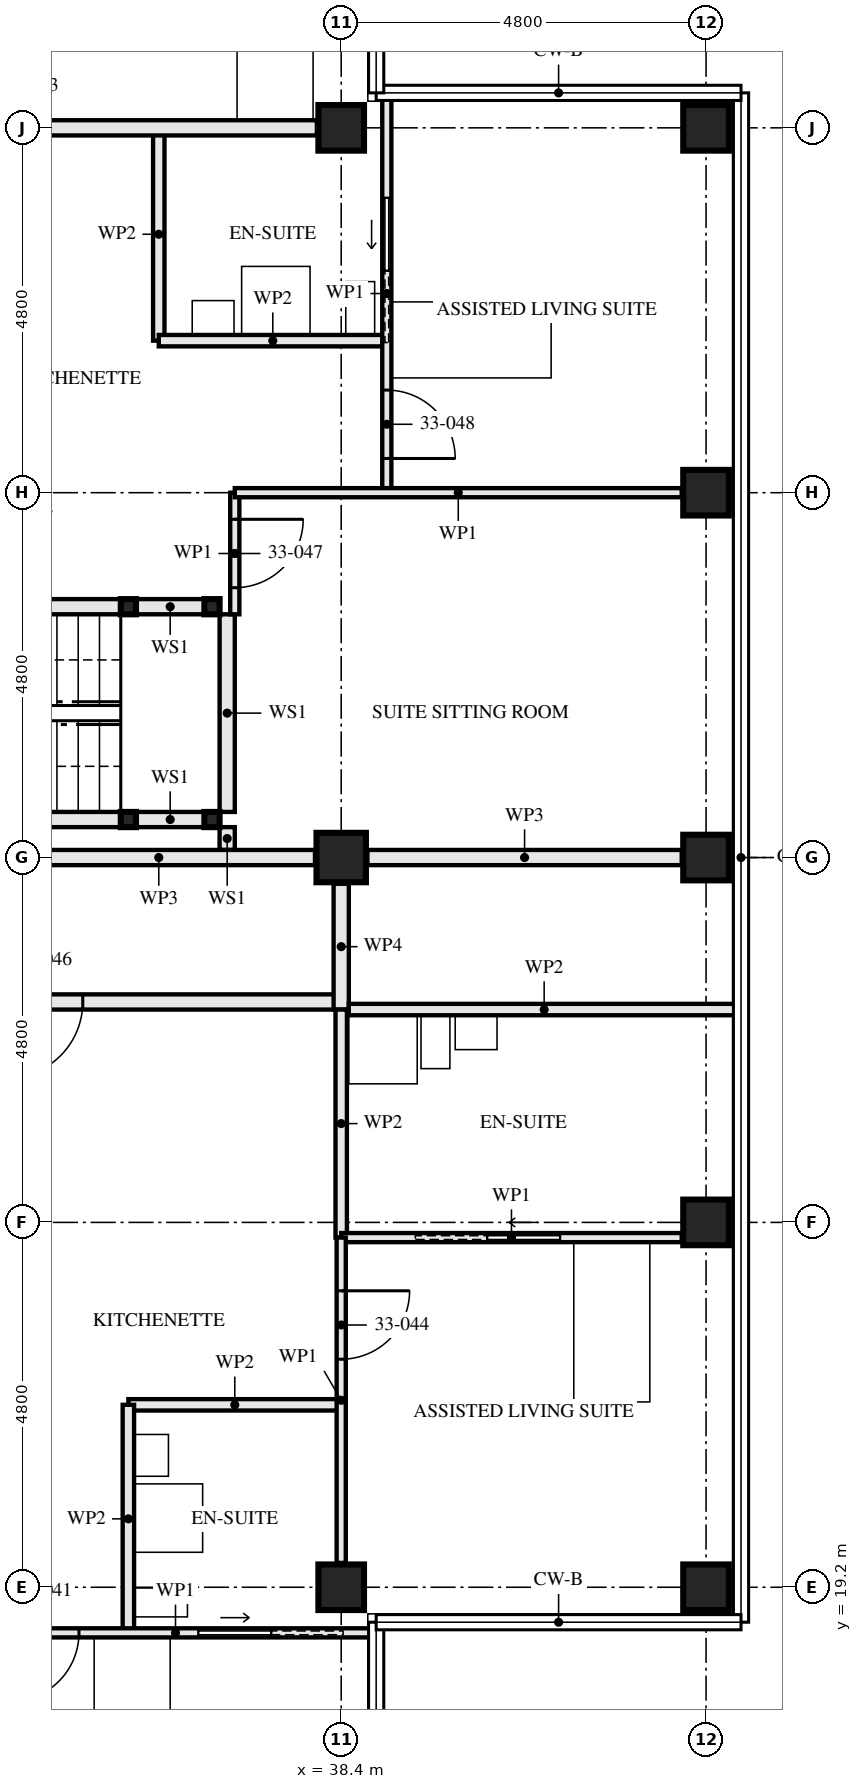
"""IFC4 building model, lengths in metres.
Left out: names, types, materials, properties, quantities, classifications, styles, units other than length and angle.
Written with IfcOpenShell. Run it as: python <this file> out.ifc"""

import sys

from ifc_helpers import new_model, si_unit, direction, frame, frame_2d, origin, origin_2d, place, context, subcontext, project, spatial, rectangle, hollow_rectangle, extrude, element, fill, save


model = new_model("IFC4")
c1 = context("Model", 3, precision=1e-05, world=origin(), true_north=direction((0.0, 1.0)))
c2 = subcontext(c1, "Body", "Model", "MODEL_VIEW")
j1 = project(units=[si_unit("LENGTHUNIT", "METRE"), si_unit("PLANEANGLEUNIT", "RADIAN")], contexts=[c1])
p1 = place(None, origin())
s1 = spatial("IfcSite", under=j1, at=p1, CompositionType="ELEMENT")
p2 = place(p1, origin())
s2 = spatial("IfcBuilding", under=s1, at=p2, CompositionType="ELEMENT")
p3 = place(p2, frame((0.0, 0.0, 122.5)))
s3 = spatial("IfcBuildingStorey", under=s2, at=p3, CompositionType="ELEMENT", Elevation=122.5)
p4 = place(p3, frame((38.4, 19.2, 0.0), z_axis=(0.0, 0.0, 1.0), x_axis=(0.0, 1.0, 0.0)))
e1 = element("IfcColumn", 1, at=p4, inside=s3, PredefinedType="COLUMN", context=c2, shape_type="SweptSolid", body=[
    extrude(hollow_rectangle(XDim=0.6, YDim=0.6, WallThickness=0.08, at=origin_2d()), origin(), (0.0, 0.0, 1.0), 3.5),
])
p5 = place(p3, frame((38.4, 28.8, 0.0), z_axis=(0.0, 0.0, 1.0), x_axis=(0.0, 1.0, 0.0)))
e2 = element("IfcColumn", 2, at=p5, inside=s3, PredefinedType="COLUMN", context=c2, shape_type="SweptSolid", body=[
    extrude(hollow_rectangle(XDim=0.65, YDim=0.65, WallThickness=0.05, at=origin_2d()), origin(), (0.0, 0.0, 1.0), 3.5),
])
for number, where, z_axis, x_axis in (
    (3, (38.4, 38.4, 0.0), (0.0, 0.0, 1.0), (0.0, 1.0, 0.0)),
    (4, (43.2, 19.2, 0.0), (0.0, 0.0, 1.0), (0.0, 1.0, 0.0)),
    (5, (43.2, 24.0, 0.0), (0.0, 0.0, 1.0), (1.0, 0.0, 0.0)),
    (6, (43.2, 28.8, 0.0), (0.0, 0.0, 1.0), (0.0, 1.0, 0.0)),
    (7, (43.2, 33.6, 0.0), (0.0, 0.0, 1.0), (1.0, 0.0, 0.0)),
    (8, (43.2, 38.4, 0.0), (0.0, 0.0, 1.0), (0.0, 1.0, 0.0)),
):
    element("IfcColumn", number, at=place(p3, frame(where, z_axis=z_axis, x_axis=x_axis)), inside=s3, PredefinedType="COLUMN", context=c2, shape_type="SweptSolid", body=[
        extrude(hollow_rectangle(XDim=0.6, YDim=0.6, WallThickness=0.08, at=origin_2d()), origin(), (0.0, 0.0, 1.0), 3.5),
    ])
for number, where, z_axis, x_axis in (
    (9, (36.7, 29.3, 0.0), (0.0, 0.0, 1.0), (1.0, 0.0, 0.0)),
    (10, (36.7, 32.1, 0.0), (0.0, 0.0, 1.0), (1.0, 0.0, 0.0)),
    (11, (35.6, 29.3, 0.0), (0.0, 0.0, 1.0), (1.0, 0.0, 0.0)),
    (12, (35.6, 32.1, 0.0), (0.0, 0.0, 1.0), (1.0, 0.0, 0.0)),
):
    element("IfcColumn", number, at=place(p3, frame(where, z_axis=z_axis, x_axis=x_axis)), inside=s3, PredefinedType="COLUMN", context=c2, shape_type="SweptSolid", body=[
        extrude(hollow_rectangle(XDim=0.2, YDim=0.2, WallThickness=0.008, at=origin_2d()), origin(), (0.0, 0.0, 1.0), 3.33),
    ])
p6 = place(p3, frame((35.6, 18.6, 0.0), z_axis=(0.0, 0.0, 1.0), x_axis=(0.0, 1.0, 0.0)))
e13 = element("IfcWall", 13, at=p6, inside=s3, PredefinedType="PARTITIONING", context=c2, shape_type="SweptSolid", body=[
    extrude(rectangle(XDim=3.0, YDim=0.15, at=frame_2d((1.5, 0.0))), origin(), (0.0, 0.0, 1.0), 2.55),
])
p7 = place(p3, frame((35.6, 21.6, 0.0), z_axis=(0.0, 0.0, 1.0), x_axis=(1.0, 0.0, 0.0)))
e14 = element("IfcWall", 14, at=p7, inside=s3, PredefinedType="PARTITIONING", context=c2, shape_type="SweptSolid", body=[
    extrude(rectangle(XDim=2.8, YDim=0.15, at=frame_2d((1.4, 0.0))), origin(), (0.0, 0.0, 1.0), 3.33),
])
p8 = place(p3, frame((38.4, 23.8, 0.0), z_axis=(0.0, 0.0, 1.0), x_axis=(0.0, 1.0, 0.0)))
e15 = element("IfcWall", 15, at=p8, inside=s3, PredefinedType="PARTITIONING", context=c2, shape_type="SweptSolid", body=[
    extrude(rectangle(XDim=3.0, YDim=0.15, at=frame_2d((1.5, 0.0))), origin(), (0.0, 0.0, 1.0), 2.55),
])
p9 = place(p3, frame((33.6, 18.6, 0.0), z_axis=(0.0, 0.0, 1.0), x_axis=(1.0, 0.0, 0.0)))
e16 = element("IfcWall", 16, at=p9, inside=s3, PredefinedType="PARTITIONING", context=c2, shape_type="SweptSolid", body=[
    extrude(rectangle(XDim=5.24, YDim=0.12, at=frame_2d((2.62, 0.0))), origin(), (0.0, 0.0, 1.0), 2.32),
])
p10 = place(p9, frame((0.45, 0.0, 0.0)))
e17 = element("IfcOpeningElement", 17, at=p10, cuts=e16, PredefinedType="OPENING", context=c2, shape_type="SweptSolid", body=[
    extrude(rectangle(XDim=0.9, YDim=2.1, at=frame_2d((0.45, 1.05))), frame((0.0, 0.071, 0.0), z_axis=(0.0, -1.0, 0.0), x_axis=(1.0, 0.0, 0.0)), (0.0, 0.0, 1.0), 0.141),
])
p11 = place(p9, frame((2.925, 0.0, 0.0)))
e18 = element("IfcOpeningElement", 18, at=p11, cuts=e16, PredefinedType="OPENING", context=c2, shape_type="SweptSolid", body=[
    extrude(rectangle(XDim=0.95, YDim=2.1, at=frame_2d((0.475, 1.05))), frame((0.0, 0.071, 0.0), z_axis=(0.0, -1.0, 0.0), x_axis=(1.0, 0.0, 0.0)), (0.0, 0.0, 1.0), 0.141),
])
p12 = place(p3, frame((38.4, 23.8, 0.0), z_axis=(0.0, 0.0, 1.0), x_axis=(1.0, 0.0, 0.0)))
e19 = element("IfcWall", 19, at=p12, inside=s3, PredefinedType="PARTITIONING", context=c2, shape_type="SweptSolid", body=[
    extrude(rectangle(XDim=4.48, YDim=0.12, at=frame_2d((2.24, 0.0))), origin(), (0.0, 0.0, 1.0), 3.33),
])
p13 = place(p12, frame((1.925, 0.0, 0.0)))
e20 = element("IfcOpeningElement", 20, at=p13, cuts=e19, PredefinedType="OPENING", context=c2, shape_type="SweptSolid", body=[
    extrude(rectangle(XDim=0.95, YDim=2.1, at=frame_2d((0.475, 1.05))), frame((0.0, 0.071, 0.0), z_axis=(0.0, -1.0, 0.0), x_axis=(1.0, 0.0, 0.0)), (0.0, 0.0, 1.0), 0.141),
])
p14 = place(p3, frame((38.4, 19.52, 0.0), z_axis=(0.0, 0.0, 1.0), x_axis=(0.0, 1.0, 0.0)))
e21 = element("IfcWall", 21, at=p14, inside=s3, PredefinedType="PARTITIONING", context=c2, shape_type="SweptSolid", body=[
    extrude(rectangle(XDim=4.28, YDim=0.12, at=frame_2d((2.14, 0.0))), origin(), (0.0, 0.0, 1.0), 3.33),
])
p15 = place(p14, frame((2.68, 0.0, 0.0)))
e22 = element("IfcOpeningElement", 22, at=p15, cuts=e21, PredefinedType="OPENING", context=c2, shape_type="SweptSolid", body=[
    extrude(rectangle(XDim=0.9, YDim=2.1, at=frame_2d((0.45, 1.05))), frame((0.0, 0.071, 0.0), z_axis=(0.0, -1.0, 0.0), x_axis=(1.0, 0.0, 0.0)), (0.0, 0.0, 1.0), 0.141),
])
p16 = place(p3, frame((28.8, 26.9, 0.0), z_axis=(0.0, 0.0, 1.0), x_axis=(1.0, 0.0, 0.0)))
e23 = element("IfcWall", 23, at=p16, inside=s3, PredefinedType="PARTITIONING", context=c2, shape_type="SweptSolid", body=[
    extrude(rectangle(XDim=9.6, YDim=0.2, at=frame_2d((4.8, 0.0))), origin(), (0.0, 0.0, 1.0), 3.33),
])
p17 = place(p16, frame((0.4, 0.0, 0.0)))
e24 = element("IfcOpeningElement", 24, at=p17, cuts=e23, PredefinedType="OPENING", context=c2, shape_type="SweptSolid", body=[
    extrude(rectangle(XDim=1.0, YDim=2.1, at=frame_2d((0.5, 1.05))), frame((0.0, 0.111, 0.0), z_axis=(0.0, -1.0, 0.0), x_axis=(1.0, 0.0, 0.0)), (0.0, 0.0, 1.0), 0.221),
])
p18 = place(p16, frame((5.2, 0.0, 0.0)))
e25 = element("IfcOpeningElement", 25, at=p18, cuts=e23, PredefinedType="OPENING", context=c2, shape_type="SweptSolid", body=[
    extrude(rectangle(XDim=1.0, YDim=2.1, at=frame_2d((0.5, 1.05))), frame((0.0, 0.111, 0.0), z_axis=(0.0, -1.0, 0.0), x_axis=(1.0, 0.0, 0.0)), (0.0, 0.0, 1.0), 0.221),
])
p19 = place(p3, frame((38.4, 26.8, 0.0), z_axis=(0.0, 0.0, 1.0), x_axis=(0.0, 1.0, 0.0)))
e26 = element("IfcWall", 26, at=p19, inside=s3, PredefinedType="PARTITIONING", context=c2, shape_type="SweptSolid", body=[
    extrude(rectangle(XDim=1.655, YDim=0.2, at=frame_2d((0.828, 0.0))), origin(), (0.0, 0.0, 1.0), 3.33),
])
p20 = place(p3, frame((36.6, 29.3, 0.0), z_axis=(0.0, 0.0, 1.0), x_axis=(-1.0, 0.0, 0.0)))
e27 = element("IfcWall", 27, at=p20, inside=s3, PredefinedType="SOLIDWALL", context=c2, shape_type="SweptSolid", body=[
    extrude(rectangle(XDim=0.9, YDim=0.2, at=frame_2d((0.45, 0.0))), origin(), (0.0, 0.0, 1.0), 2.99),
])
p21 = place(p3, frame((35.5, 29.3, 0.0), z_axis=(0.0, 0.0, 1.0), x_axis=(-1.0, 0.0, 0.0)))
e28 = element("IfcWall", 28, at=p21, inside=s3, PredefinedType="SOLIDWALL", context=c2, shape_type="SweptSolid", body=[
    extrude(rectangle(XDim=4.7, YDim=0.2, at=frame_2d((2.35, 0.0))), origin(), (0.0, 0.0, 1.0), 2.99),
])
p22 = place(p3, frame((36.6, 32.1, 0.0), z_axis=(0.0, 0.0, 1.0), x_axis=(-1.0, 0.0, 0.0)))
e29 = element("IfcWall", 29, at=p22, inside=s3, PredefinedType="SOLIDWALL", context=c2, shape_type="SweptSolid", body=[
    extrude(rectangle(XDim=0.9, YDim=0.2, at=frame_2d((0.45, 0.0))), origin(), (0.0, 0.0, 1.0), 2.99),
])
p23 = place(p3, frame((35.5, 32.1, 0.0), z_axis=(0.0, 0.0, 1.0), x_axis=(-1.0, 0.0, 0.0)))
e30 = element("IfcWall", 30, at=p23, inside=s3, PredefinedType="SOLIDWALL", context=c2, shape_type="SweptSolid", body=[
    extrude(rectangle(XDim=4.7, YDim=0.2, at=frame_2d((2.35, 0.0))), origin(), (0.0, 0.0, 1.0), 2.99),
])
p24 = place(p3, frame((36.9, 28.9, 0.0), z_axis=(0.0, 0.0, 1.0), x_axis=(0.0, 1.0, 0.0)))
e31 = element("IfcWall", 31, at=p24, inside=s3, PredefinedType="SOLIDWALL", context=c2, shape_type="SweptSolid", body=[
    extrude(rectangle(XDim=0.3, YDim=0.2, at=frame_2d((0.15, 0.0))), origin(), (0.0, 0.0, 1.0), 3.33),
])
p25 = place(p3, frame((36.9, 29.4, 0.0), z_axis=(0.0, 0.0, 1.0), x_axis=(0.0, 1.0, 0.0)))
e32 = element("IfcWall", 32, at=p25, inside=s3, PredefinedType="SOLIDWALL", context=c2, shape_type="SweptSolid", body=[
    extrude(rectangle(XDim=2.6, YDim=0.2, at=frame_2d((1.3, 0.0))), origin(), (0.0, 0.0, 1.0), 3.33),
])
p26 = place(p3, frame((39.0, 35.6, 0.0), z_axis=(0.0, 0.0, 1.0), x_axis=(-1.0, 0.0, 0.0)))
e33 = element("IfcWall", 33, at=p26, inside=s3, PredefinedType="PARTITIONING", context=c2, shape_type="SweptSolid", body=[
    extrude(rectangle(XDim=3.0, YDim=0.15, at=frame_2d((1.5, 0.0))), origin(), (0.0, 0.0, 1.0), 3.33),
])
p27 = place(p3, frame((36.0, 35.6, 0.0), z_axis=(0.0, 0.0, 1.0), x_axis=(0.0, 1.0, 0.0)))
e34 = element("IfcWall", 34, at=p27, inside=s3, PredefinedType="PARTITIONING", context=c2, shape_type="SweptSolid", body=[
    extrude(rectangle(XDim=2.8, YDim=0.15, at=frame_2d((1.4, 0.0))), origin(), (0.0, 0.0, 1.0), 3.33),
])
p28 = place(p3, frame((37.0, 32.0, 0.0), z_axis=(0.0, 0.0, 1.0), x_axis=(0.0, 1.0, 0.0)))
e35 = element("IfcWall", 35, at=p28, inside=s3, PredefinedType="PARTITIONING", context=c2, shape_type="SweptSolid", body=[
    extrude(rectangle(XDim=1.6, YDim=0.12, at=frame_2d((0.8, 0.0))), origin(), (0.0, 0.0, 1.0), 3.33),
])
p29 = place(p28, frame((0.35, 0.0, 0.0)))
e36 = element("IfcOpeningElement", 36, at=p29, cuts=e35, PredefinedType="OPENING", context=c2, shape_type="SweptSolid", body=[
    extrude(rectangle(XDim=0.9, YDim=2.1, at=frame_2d((0.45, 1.05))), frame((0.0, 0.071, 0.0), z_axis=(0.0, -1.0, 0.0), x_axis=(1.0, 0.0, 0.0)), (0.0, 0.0, 1.0), 0.141),
])
p30 = place(p3, frame((39.0, 33.6, 0.0), z_axis=(0.0, 0.0, 1.0), x_axis=(0.0, 1.0, 0.0)))
e37 = element("IfcWall", 37, at=p30, inside=s3, PredefinedType="PARTITIONING", context=c2, shape_type="SweptSolid", body=[
    extrude(rectangle(XDim=5.24, YDim=0.12, at=frame_2d((2.62, 0.0))), origin(), (0.0, 0.0, 1.0), 2.32),
])
p31 = place(p30, frame((0.45, 0.0, 0.0)))
e38 = element("IfcOpeningElement", 38, at=p31, cuts=e37, PredefinedType="OPENING", context=c2, shape_type="SweptSolid", body=[
    extrude(rectangle(XDim=0.9, YDim=2.1, at=frame_2d((0.45, 1.05))), frame((0.0, 0.071, 0.0), z_axis=(0.0, -1.0, 0.0), x_axis=(1.0, 0.0, 0.0)), (0.0, 0.0, 1.0), 0.141),
])
p32 = place(p30, frame((2.925, 0.0, 0.0)))
e39 = element("IfcOpeningElement", 39, at=p32, cuts=e37, PredefinedType="OPENING", context=c2, shape_type="SweptSolid", body=[
    extrude(rectangle(XDim=0.95, YDim=2.1, at=frame_2d((0.475, 1.05))), frame((0.0, 0.071, 0.0), z_axis=(0.0, -1.0, 0.0), x_axis=(1.0, 0.0, 0.0)), (0.0, 0.0, 1.0), 0.141),
])
p33 = place(p3, frame((42.88, 33.6, 0.0), z_axis=(0.0, 0.0, 1.0), x_axis=(-1.0, 0.0, 0.0)))
e40 = element("IfcWall", 40, at=p33, inside=s3, PredefinedType="PARTITIONING", context=c2, shape_type="SweptSolid", body=[
    extrude(rectangle(XDim=5.88, YDim=0.12, at=frame_2d((2.94, 0.0))), origin(), (0.0, 0.0, 1.0), 2.55),
])
p34 = place(p3, frame((38.08, 38.4, 0.0), z_axis=(0.0, 0.0, 1.0), x_axis=(-1.0, 0.0, 0.0)))
e41 = element("IfcWall", 41, at=p34, inside=s3, PredefinedType="PARTITIONING", context=c2, shape_type="SweptSolid", body=[
    extrude(rectangle(XDim=7.28, YDim=0.2, at=frame_2d((3.64, 0.0))), origin(), (0.0, 0.0, 1.0), 2.55),
])
p35 = place(p3, frame((42.88, 28.8, 0.0), z_axis=(0.0, 0.0, 1.0), x_axis=(-1.0, 0.0, 0.0)))
e42 = element("IfcWall", 42, at=p35, inside=s3, PredefinedType="PARTITIONING", context=c2, shape_type="SweptSolid", body=[
    extrude(rectangle(XDim=4.135, YDim=0.2, at=frame_2d((2.067, 0.0))), origin(), (0.0, 0.0, 1.0), 2.32),
])
p36 = place(p3, frame((38.055, 28.8, 0.0), z_axis=(0.0, 0.0, 1.0), x_axis=(-1.0, 0.0, 0.0)))
e43 = element("IfcWall", 43, at=p36, inside=s3, PredefinedType="PARTITIONING", context=c2, shape_type="SweptSolid", body=[
    extrude(rectangle(XDim=4.11, YDim=0.2, at=frame_2d((2.055, 0.0))), origin(), (0.0, 0.0, 1.0), 2.32),
])
p37 = place(p3, frame((38.5, 26.8, 0.0), z_axis=(0.0, 0.0, 1.0), x_axis=(1.0, 0.0, 0.0)))
e44 = element("IfcWall", 44, at=p37, inside=s3, PredefinedType="PARTITIONING", context=c2, shape_type="SweptSolid", body=[
    extrude(rectangle(XDim=5.14, YDim=0.15, at=frame_2d((2.57, 0.0))), origin(), (0.0, 0.0, 1.0), 2.32),
])
p38 = place(p10, frame((0.9, 0.0, 0.0), z_axis=(0.0, 0.0, 1.0), x_axis=(-1.0, 0.0, 0.0)))
e45 = element("IfcDoor", 45, at=p38, inside=s3, OperationType="SINGLE_SWING_LEFT", PredefinedType="DOOR", context=c2, shape_type="SweptSolid", body=[
    extrude(rectangle(XDim=0.9, YDim=2.1, at=frame_2d((0.45, 1.05))), frame((0.0, 0.022, 0.0), z_axis=(0.0, -1.0, 0.0), x_axis=(1.0, 0.0, 0.0)), (0.0, 0.0, 1.0), 0.044),
])
fill(e17, e45)
p39 = place(p11, origin())
e46 = element("IfcDoor", 46, at=p39, inside=s3, OperationType="SLIDING_TO_LEFT", PredefinedType="DOOR", context=c2, shape_type="SweptSolid", body=[
    extrude(rectangle(XDim=0.95, YDim=2.1, at=frame_2d((0.475, 1.05))), frame((0.0, 0.022, 0.0), z_axis=(0.0, -1.0, 0.0), x_axis=(1.0, 0.0, 0.0)), (0.0, 0.0, 1.0), 0.044),
])
fill(e18, e46)
p40 = place(p13, origin())
e47 = element("IfcDoor", 47, at=p40, inside=s3, OperationType="SLIDING_TO_RIGHT", PredefinedType="DOOR", context=c2, shape_type="SweptSolid", body=[
    extrude(rectangle(XDim=0.95, YDim=2.1, at=frame_2d((0.475, 1.05))), frame((0.0, 0.022, 0.0), z_axis=(0.0, -1.0, 0.0), x_axis=(1.0, 0.0, 0.0)), (0.0, 0.0, 1.0), 0.044),
])
fill(e20, e47)
p41 = place(p15, frame((0.9, 0.0, 0.0), z_axis=(0.0, 0.0, 1.0), x_axis=(-1.0, 0.0, 0.0)))
e48 = element("IfcDoor", 48, at=p41, inside=s3, OperationType="SINGLE_SWING_RIGHT", PredefinedType="DOOR", context=c2, shape_type="SweptSolid", body=[
    extrude(rectangle(XDim=0.9, YDim=2.1, at=frame_2d((0.45, 1.05))), frame((0.0, 0.022, 0.0), z_axis=(0.0, -1.0, 0.0), x_axis=(1.0, 0.0, 0.0)), (0.0, 0.0, 1.0), 0.044),
])
fill(e22, e48)
p42 = place(p18, frame((1.0, 0.0, 0.0), z_axis=(0.0, 0.0, 1.0), x_axis=(-1.0, 0.0, 0.0)))
e49 = element("IfcDoor", 49, at=p42, inside=s3, OperationType="SINGLE_SWING_LEFT", PredefinedType="DOOR", context=c2, shape_type="SweptSolid", body=[
    extrude(rectangle(XDim=1.0, YDim=2.1, at=frame_2d((0.5, 1.05))), frame((0.0, 0.027, 0.0), z_axis=(0.0, -1.0, 0.0), x_axis=(1.0, 0.0, 0.0)), (0.0, 0.0, 1.0), 0.054),
])
fill(e25, e49)
p43 = place(p29, frame((0.9, 0.0, 0.0), z_axis=(0.0, 0.0, 1.0), x_axis=(-1.0, 0.0, 0.0)))
e50 = element("IfcDoor", 50, at=p43, inside=s3, OperationType="SINGLE_SWING_RIGHT", PredefinedType="DOOR", context=c2, shape_type="SweptSolid", body=[
    extrude(rectangle(XDim=0.9, YDim=2.1, at=frame_2d((0.45, 1.05))), frame((0.0, 0.022, 0.0), z_axis=(0.0, -1.0, 0.0), x_axis=(1.0, 0.0, 0.0)), (0.0, 0.0, 1.0), 0.044),
])
fill(e36, e50)
p44 = place(p31, frame((0.9, 0.0, 0.0), z_axis=(0.0, 0.0, 1.0), x_axis=(-1.0, 0.0, 0.0)))
e51 = element("IfcDoor", 51, at=p44, inside=s3, OperationType="SINGLE_SWING_LEFT", PredefinedType="DOOR", context=c2, shape_type="SweptSolid", body=[
    extrude(rectangle(XDim=0.9, YDim=2.1, at=frame_2d((0.45, 1.05))), frame((0.0, 0.022, 0.0), z_axis=(0.0, -1.0, 0.0), x_axis=(1.0, 0.0, 0.0)), (0.0, 0.0, 1.0), 0.044),
])
fill(e38, e51)
p45 = place(p32, origin())
e52 = element("IfcDoor", 52, at=p45, inside=s3, OperationType="SLIDING_TO_RIGHT", PredefinedType="DOOR", context=c2, shape_type="SweptSolid", body=[
    extrude(rectangle(XDim=0.95, YDim=2.1, at=frame_2d((0.475, 1.05))), frame((0.0, 0.022, 0.0), z_axis=(0.0, -1.0, 0.0), x_axis=(1.0, 0.0, 0.0)), (0.0, 0.0, 1.0), 0.044),
])
fill(e39, e52)
save(model, sys.argv[1])
